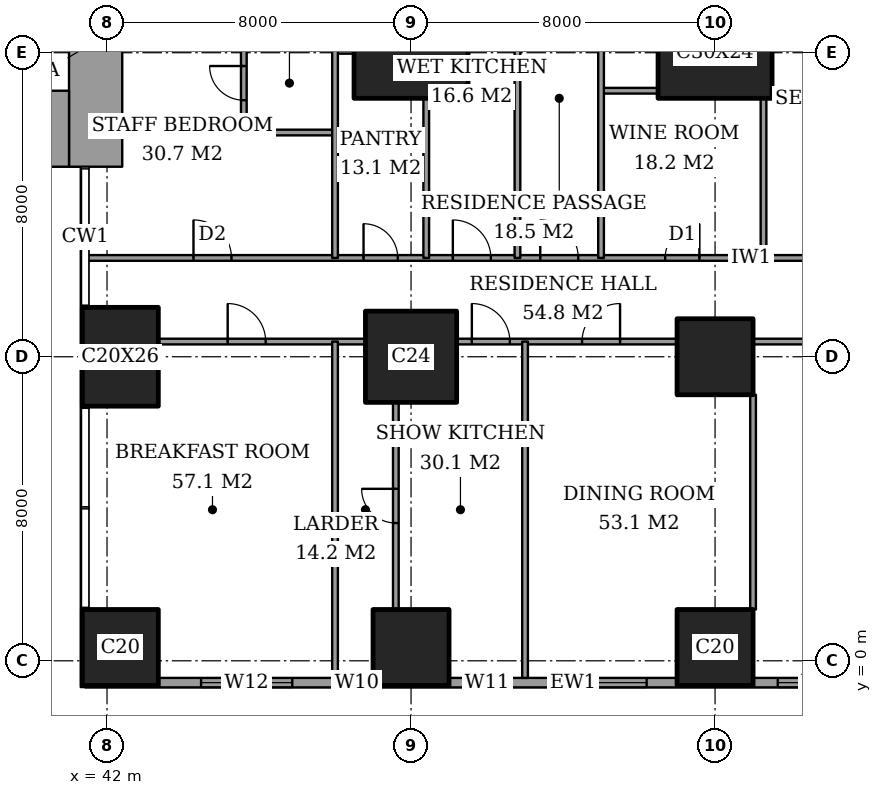
"""IFC4 building model, lengths in metres.
Left out: names, types, materials, properties, quantities, classifications, styles, units other than length and angle.
Written with IfcOpenShell. Run it as: python <this file> out.ifc"""

import sys

from ifc_helpers import new_model, si_unit, direction, frame, frame_2d, origin, origin_2d, place, context, subcontext, project, spatial, rectangle, extrude, element, fill, save


model = new_model("IFC4")
c1 = context("Model", 3, precision=1e-05, world=origin(), true_north=direction((0.0, 1.0)))
c2 = subcontext(c1, "Body", "Model", "MODEL_VIEW")
j1 = project(units=[si_unit("LENGTHUNIT", "METRE"), si_unit("PLANEANGLEUNIT", "RADIAN")], contexts=[c1])
p1 = place(None, origin())
s1 = spatial("IfcSite", under=j1, at=p1, CompositionType="ELEMENT")
p2 = place(p1, origin())
s2 = spatial("IfcBuilding", under=s1, at=p2, CompositionType="ELEMENT")
p3 = place(p2, frame((0.0, 0.0, 143.0)))
s3 = spatial("IfcBuildingStorey", under=s2, at=p3, CompositionType="ELEMENT", Elevation=143.0)
p4 = place(p3, frame((42.35, 0.35, 0.0), z_axis=(0.0, 0.0, 1.0), x_axis=(1.0, 0.0, 0.0)))
e1 = element("IfcColumn", 1, at=p4, inside=s3, PredefinedType="COLUMN", context=c2, shape_type="SweptSolid", body=[
    extrude(rectangle(XDim=2.0, YDim=2.0, at=origin_2d()), origin(), (0.0, 0.0, 1.0), 3.6),
])
p5 = place(p3, frame((42.35, 8.0, 0.0), z_axis=(0.0, 0.0, 1.0), x_axis=(1.0, 0.0, 0.0)))
e2 = element("IfcColumn", 2, at=p5, inside=s3, PredefinedType="COLUMN", context=c2, shape_type="SweptSolid", body=[
    extrude(rectangle(XDim=2.0, YDim=2.6, at=origin_2d()), origin(), (0.0, 0.0, 1.0), 3.6),
])
p6 = place(p3, frame((50.0, 0.35, 0.0), z_axis=(0.0, 0.0, 1.0), x_axis=(1.0, 0.0, 0.0)))
e3 = element("IfcColumn", 3, at=p6, inside=s3, PredefinedType="COLUMN", context=c2, shape_type="SweptSolid", body=[
    extrude(rectangle(XDim=2.0, YDim=2.0, at=origin_2d()), origin(), (0.0, 0.0, 1.0), 3.6),
])
p7 = place(p3, frame((50.0, 8.0, 0.0), z_axis=(0.0, 0.0, 1.0), x_axis=(1.0, 0.0, 0.0)))
e4 = element("IfcColumn", 4, at=p7, inside=s3, PredefinedType="COLUMN", context=c2, shape_type="SweptSolid", body=[
    extrude(rectangle(XDim=2.4, YDim=2.4, at=origin_2d()), origin(), (0.0, 0.0, 1.0), 3.6),
])
p8 = place(p3, frame((50.0, 16.0, 0.0), z_axis=(0.0, 0.0, 1.0), x_axis=(1.0, 0.0, 0.0)))
e5 = element("IfcColumn", 5, at=p8, inside=s3, PredefinedType="COLUMN", context=c2, shape_type="SweptSolid", body=[
    extrude(rectangle(XDim=3.0, YDim=2.4, at=origin_2d()), origin(), (0.0, 0.0, 1.0), 3.6),
])
for number, where, z_axis, x_axis in (
    (6, (58.0, 0.35, 0.0), (0.0, 0.0, 1.0), (1.0, 0.0, 0.0)),
    (7, (58.0, 8.0, 0.0), (0.0, 0.0, 1.0), (1.0, 0.0, 0.0)),
):
    element("IfcColumn", number, at=place(p3, frame(where, z_axis=z_axis, x_axis=x_axis)), inside=s3, PredefinedType="COLUMN", context=c2, shape_type="SweptSolid", body=[
        extrude(rectangle(XDim=2.0, YDim=2.0, at=origin_2d()), origin(), (0.0, 0.0, 1.0), 3.6),
    ])
p9 = place(p3, frame((58.0, 16.0, 0.0), z_axis=(0.0, 0.0, 1.0), x_axis=(1.0, 0.0, 0.0)))
e8 = element("IfcColumn", 8, at=p9, inside=s3, PredefinedType="COLUMN", context=c2, shape_type="SweptSolid", body=[
    extrude(rectangle(XDim=3.0, YDim=2.4, at=origin_2d()), origin(), (0.0, 0.0, 1.0), 3.6),
])
p10 = place(p3, frame((37.85, 14.0, 0.0), z_axis=(0.0, 0.0, 1.0), x_axis=(1.0, 0.0, 0.0)))
e9 = element("IfcWall", 9, at=p10, inside=s3, PredefinedType="SHEAR", context=c2, shape_type="SweptSolid", body=[
    extrude(rectangle(XDim=3.15, YDim=2.0, at=frame_2d((1.575, 0.0))), origin(), (0.0, 0.0, 1.0), 3.6),
])
p11 = place(p3, frame((41.7, 13.0, 0.0), z_axis=(0.0, 0.0, 1.0), x_axis=(0.0, 1.0, 0.0)))
e10 = element("IfcWall", 10, at=p11, inside=s3, PredefinedType="SHEAR", context=c2, shape_type="SweptSolid", body=[
    extrude(rectangle(XDim=11.85, YDim=1.4, at=frame_2d((5.925, 0.0))), origin(), (0.0, 0.0, 1.0), 3.6),
])
p12 = place(p11, frame((7.5, 0.0, 0.0)))
e11 = element("IfcOpeningElement", 11, at=p12, cuts=e10, PredefinedType="OPENING", context=c2, shape_type="SweptSolid", body=[
    extrude(rectangle(XDim=1.8, YDim=2.4, at=frame_2d((0.9, 1.2))), frame((0.0, 0.71, 0.0), z_axis=(0.0, -1.0, 0.0), x_axis=(1.0, 0.0, 0.0)), (0.0, 0.0, 1.0), 1.42),
])
p13 = place(p3, frame((41.425, -0.575, 0.0), z_axis=(0.0, 0.0, 1.0), x_axis=(1.0, 0.0, 0.0)))
e12 = element("IfcWall", 12, at=p13, inside=s3, PredefinedType="SOLIDWALL", context=c2, shape_type="SweptSolid", body=[
    extrude(rectangle(XDim=21.4, YDim=0.25, at=frame_2d((10.7, 0.0))), origin(), (0.0, 0.0, 1.0), 3.6),
])
p14 = place(p13, frame((3.05, 0.0, 0.4)))
e13 = element("IfcOpeningElement", 13, at=p14, cuts=e12, PredefinedType="OPENING", context=c2, shape_type="SweptSolid", body=[
    extrude(rectangle(XDim=2.4, YDim=2.2, at=frame_2d((1.2, 1.1))), frame((0.0, 0.135, 0.0), z_axis=(0.0, -1.0, 0.0), x_axis=(1.0, 0.0, 0.0)), (0.0, 0.0, 1.0), 0.27),
])
p15 = place(p13, frame((6.85, 0.0, 0.4)))
e14 = element("IfcOpeningElement", 14, at=p15, cuts=e12, PredefinedType="OPENING", context=c2, shape_type="SweptSolid", body=[
    extrude(rectangle(XDim=0.6, YDim=2.2, at=frame_2d((0.3, 1.1))), frame((0.0, 0.135, 0.0), z_axis=(0.0, -1.0, 0.0), x_axis=(1.0, 0.0, 0.0)), (0.0, 0.0, 1.0), 0.27),
])
p16 = place(p13, frame((9.975, 0.0, 0.4)))
e15 = element("IfcOpeningElement", 15, at=p16, cuts=e12, PredefinedType="OPENING", context=c2, shape_type="SweptSolid", body=[
    extrude(rectangle(XDim=1.2, YDim=2.2, at=frame_2d((0.6, 1.1))), frame((0.0, 0.135, 0.0), z_axis=(0.0, -1.0, 0.0), x_axis=(1.0, 0.0, 0.0)), (0.0, 0.0, 1.0), 0.27),
])
p17 = place(p13, frame((12.375, 0.0, 0.4)))
e16 = element("IfcOpeningElement", 16, at=p17, cuts=e12, PredefinedType="OPENING", context=c2, shape_type="SweptSolid", body=[
    extrude(rectangle(XDim=2.4, YDim=2.2, at=frame_2d((1.2, 1.1))), frame((0.0, 0.135, 0.0), z_axis=(0.0, -1.0, 0.0), x_axis=(1.0, 0.0, 0.0)), (0.0, 0.0, 1.0), 0.27),
])
p18 = place(p13, frame((18.225, 0.0, 0.4)))
e17 = element("IfcOpeningElement", 17, at=p18, cuts=e12, PredefinedType="OPENING", context=c2, shape_type="SweptSolid", body=[
    extrude(rectangle(XDim=2.4, YDim=2.2, at=frame_2d((1.2, 1.1))), frame((0.0, 0.135, 0.0), z_axis=(0.0, -1.0, 0.0), x_axis=(1.0, 0.0, 0.0)), (0.0, 0.0, 1.0), 0.27),
])
p19 = place(p3, frame((43.35, 8.4, 0.0), z_axis=(0.0, 0.0, 1.0), x_axis=(1.0, 0.0, 0.0)))
e18 = element("IfcWall", 18, at=p19, inside=s3, PredefinedType="PARTITIONING", context=c2, shape_type="SweptSolid", body=[
    extrude(rectangle(XDim=5.45, YDim=0.15, at=frame_2d((2.725, 0.0))), origin(), (0.0, 0.0, 1.0), 3.35),
])
p20 = place(p19, frame((1.825, 0.0, 0.0)))
e19 = element("IfcOpeningElement", 19, at=p20, cuts=e18, PredefinedType="OPENING", context=c2, shape_type="SweptSolid", body=[
    extrude(rectangle(XDim=1.0, YDim=2.1, at=frame_2d((0.5, 1.05))), frame((0.0, 0.085, 0.0), z_axis=(0.0, -1.0, 0.0), x_axis=(1.0, 0.0, 0.0)), (0.0, 0.0, 1.0), 0.17),
])
p21 = place(p3, frame((51.2, 8.4, 0.0), z_axis=(0.0, 0.0, 1.0), x_axis=(1.0, 0.0, 0.0)))
e20 = element("IfcWall", 20, at=p21, inside=s3, PredefinedType="PARTITIONING", context=c2, shape_type="SweptSolid", body=[
    extrude(rectangle(XDim=5.8, YDim=0.15, at=frame_2d((2.9, 0.0))), origin(), (0.0, 0.0, 1.0), 3.35),
])
p22 = place(p21, frame((3.3, 0.0, 0.0)))
e21 = element("IfcOpeningElement", 21, at=p22, cuts=e20, PredefinedType="OPENING", context=c2, shape_type="SweptSolid", body=[
    extrude(rectangle(XDim=1.0, YDim=2.1, at=frame_2d((0.5, 1.05))), frame((0.0, 0.085, 0.0), z_axis=(0.0, -1.0, 0.0), x_axis=(1.0, 0.0, 0.0)), (0.0, 0.0, 1.0), 0.17),
])
p23 = place(p21, frame((0.4, 0.0, 0.0)))
e22 = element("IfcOpeningElement", 22, at=p23, cuts=e20, PredefinedType="OPENING", context=c2, shape_type="SweptSolid", body=[
    extrude(rectangle(XDim=1.0, YDim=2.1, at=frame_2d((0.5, 1.05))), frame((0.0, 0.085, 0.0), z_axis=(0.0, -1.0, 0.0), x_axis=(1.0, 0.0, 0.0)), (0.0, 0.0, 1.0), 0.17),
])
p24 = place(p3, frame((59.0, 8.4, 0.0), z_axis=(0.0, 0.0, 1.0), x_axis=(1.0, 0.0, 0.0)))
e23 = element("IfcWall", 23, at=p24, inside=s3, PredefinedType="PARTITIONING", context=c2, shape_type="SweptSolid", body=[
    extrude(rectangle(XDim=5.65, YDim=0.15, at=frame_2d((2.825, 0.0))), origin(), (0.0, 0.0, 1.0), 3.35),
])
p25 = place(p24, frame((2.325, 0.0, 0.0)))
e24 = element("IfcOpeningElement", 24, at=p25, cuts=e23, PredefinedType="OPENING", context=c2, shape_type="SweptSolid", body=[
    extrude(rectangle(XDim=1.0, YDim=2.1, at=frame_2d((0.5, 1.05))), frame((0.0, 0.085, 0.0), z_axis=(0.0, -1.0, 0.0), x_axis=(1.0, 0.0, 0.0)), (0.0, 0.0, 1.0), 0.17),
])
p26 = place(p3, frame((41.439, 10.6, 0.0), z_axis=(0.0, 0.0, 1.0), x_axis=(1.0, 0.0, 0.0)))
e25 = element("IfcWall", 25, at=p26, inside=s3, PredefinedType="PARTITIONING", context=c2, shape_type="SweptSolid", body=[
    extrude(rectangle(XDim=25.011, YDim=0.15, at=frame_2d((12.505, 0.0))), origin(), (0.0, 0.0, 1.0), 3.35),
])
p27 = place(p26, frame((11.961, 0.0, 0.0)))
e26 = element("IfcOpeningElement", 26, at=p27, cuts=e25, PredefinedType="OPENING", context=c2, shape_type="SweptSolid", body=[
    extrude(rectangle(XDim=1.0, YDim=2.1, at=frame_2d((0.5, 1.05))), frame((0.0, 0.085, 0.0), z_axis=(0.0, -1.0, 0.0), x_axis=(1.0, 0.0, 0.0)), (0.0, 0.0, 1.0), 0.17),
])
p28 = place(p26, frame((20.924, 0.0, 0.0)))
e27 = element("IfcOpeningElement", 27, at=p28, cuts=e25, PredefinedType="OPENING", context=c2, shape_type="SweptSolid", body=[
    extrude(rectangle(XDim=1.0, YDim=2.1, at=frame_2d((0.5, 1.05))), frame((0.0, 0.085, 0.0), z_axis=(0.0, -1.0, 0.0), x_axis=(1.0, 0.0, 0.0)), (0.0, 0.0, 1.0), 0.17),
])
p29 = place(p26, frame((15.249, 0.0, 0.0)))
e28 = element("IfcOpeningElement", 28, at=p29, cuts=e25, PredefinedType="OPENING", context=c2, shape_type="SweptSolid", body=[
    extrude(rectangle(XDim=0.9, YDim=2.1, at=frame_2d((0.45, 1.05))), frame((0.0, 0.085, 0.0), z_axis=(0.0, -1.0, 0.0), x_axis=(1.0, 0.0, 0.0)), (0.0, 0.0, 1.0), 0.17),
])
p30 = place(p26, frame((9.661, 0.0, 0.0)))
e29 = element("IfcOpeningElement", 29, at=p30, cuts=e25, PredefinedType="OPENING", context=c2, shape_type="SweptSolid", body=[
    extrude(rectangle(XDim=1.0, YDim=2.1, at=frame_2d((0.5, 1.05))), frame((0.0, 0.085, 0.0), z_axis=(0.0, -1.0, 0.0), x_axis=(1.0, 0.0, 0.0)), (0.0, 0.0, 1.0), 0.17),
])
p31 = place(p26, frame((7.311, 0.0, 0.0)))
e30 = element("IfcOpeningElement", 30, at=p31, cuts=e25, PredefinedType="OPENING", context=c2, shape_type="SweptSolid", body=[
    extrude(rectangle(XDim=0.9, YDim=2.1, at=frame_2d((0.45, 1.05))), frame((0.0, 0.085, 0.0), z_axis=(0.0, -1.0, 0.0), x_axis=(1.0, 0.0, 0.0)), (0.0, 0.0, 1.0), 0.17),
])
p32 = place(p26, frame((2.836, 0.0, 0.0)))
e31 = element("IfcOpeningElement", 31, at=p32, cuts=e25, PredefinedType="OPENING", context=c2, shape_type="SweptSolid", body=[
    extrude(rectangle(XDim=1.0, YDim=2.1, at=frame_2d((0.5, 1.05))), frame((0.0, 0.085, 0.0), z_axis=(0.0, -1.0, 0.0), x_axis=(1.0, 0.0, 0.0)), (0.0, 0.0, 1.0), 0.17),
])
p33 = place(p3, frame((45.6, 13.9, 0.0), z_axis=(0.0, 0.0, 1.0), x_axis=(1.0, 0.0, 0.0)))
e32 = element("IfcWall", 32, at=p33, inside=s3, PredefinedType="PARTITIONING", context=c2, shape_type="SweptSolid", body=[
    extrude(rectangle(XDim=2.4, YDim=0.15, at=frame_2d((1.2, 0.0))), origin(), (0.0, 0.0, 1.0), 3.35),
])
p34 = place(p3, frame((55.0, 15.0, 0.0), z_axis=(0.0, 0.0, 1.0), x_axis=(1.0, 0.0, 0.0)))
e33 = element("IfcWall", 33, at=p34, inside=s3, PredefinedType="PARTITIONING", context=c2, shape_type="SweptSolid", body=[
    extrude(rectangle(XDim=1.5, YDim=0.15, at=frame_2d((0.75, 0.0))), origin(), (0.0, 0.0, 1.0), 3.35),
])
p35 = place(p3, frame((48.0, 16.05, 0.0), z_axis=(0.0, 0.0, 1.0), x_axis=(1.0, 0.0, 0.0)))
e34 = element("IfcWall", 34, at=p35, inside=s3, PredefinedType="PARTITIONING", context=c2, shape_type="SweptSolid", body=[
    extrude(rectangle(XDim=0.5, YDim=0.15, at=frame_2d((0.25, 0.0))), origin(), (0.0, 0.0, 1.0), 2.634),
])
p36 = place(p3, frame((45.6, 13.9, 0.0), z_axis=(0.0, 0.0, 1.0), x_axis=(0.0, 1.0, 0.0)))
e35 = element("IfcWall", 35, at=p36, inside=s3, PredefinedType="PARTITIONING", context=c2, shape_type="SweptSolid", body=[
    extrude(rectangle(XDim=2.6, YDim=0.15, at=frame_2d((1.3, 0.0))), origin(), (0.0, 0.0, 1.0), 3.35),
])
p37 = place(p36, frame((0.85, 0.0, 0.0)))
e36 = element("IfcOpeningElement", 36, at=p37, cuts=e35, PredefinedType="OPENING", context=c2, shape_type="SweptSolid", body=[
    extrude(rectangle(XDim=0.9, YDim=2.1, at=frame_2d((0.45, 1.05))), frame((0.0, 0.085, 0.0), z_axis=(0.0, -1.0, 0.0), x_axis=(1.0, 0.0, 0.0)), (0.0, 0.0, 1.0), 0.17),
])
p38 = place(p3, frame((48.0, -0.45, 0.0), z_axis=(0.0, 0.0, 1.0), x_axis=(0.0, 1.0, 0.0)))
e37 = element("IfcWall", 37, at=p38, inside=s3, PredefinedType="PARTITIONING", context=c2, shape_type="SweptSolid", body=[
    extrude(rectangle(XDim=8.85, YDim=0.15, at=frame_2d((4.425, 0.0))), origin(), (0.0, 0.0, 1.0), 3.35),
])
p39 = place(p3, frame((48.0, 10.6, 0.0), z_axis=(0.0, 0.0, 1.0), x_axis=(0.0, 1.0, 0.0)))
e38 = element("IfcWall", 38, at=p39, inside=s3, PredefinedType="PARTITIONING", context=c2, shape_type="SweptSolid", body=[
    extrude(rectangle(XDim=8.4, YDim=0.15, at=frame_2d((4.2, 0.0))), origin(), (0.0, 0.0, 1.0), 3.35),
])
p40 = place(p39, frame((6.7, 0.0, 0.0)))
e39 = element("IfcOpeningElement", 39, at=p40, cuts=e38, PredefinedType="OPENING", context=c2, shape_type="SweptSolid", body=[
    extrude(rectangle(XDim=0.9, YDim=2.1, at=frame_2d((0.45, 1.05))), frame((0.0, 0.085, 0.0), z_axis=(0.0, -1.0, 0.0), x_axis=(1.0, 0.0, 0.0)), (0.0, 0.0, 1.0), 0.17),
])
p41 = place(p3, frame((49.6, 1.35, 0.0), z_axis=(0.0, 0.0, 1.0), x_axis=(0.0, 1.0, 0.0)))
e40 = element("IfcWall", 40, at=p41, inside=s3, PredefinedType="PARTITIONING", context=c2, shape_type="SweptSolid", body=[
    extrude(rectangle(XDim=5.45, YDim=0.15, at=frame_2d((2.725, 0.0))), origin(), (0.0, 0.0, 1.0), 3.35),
])
p42 = place(p41, frame((2.275, 0.0, 0.0)))
e41 = element("IfcOpeningElement", 41, at=p42, cuts=e40, PredefinedType="OPENING", context=c2, shape_type="SweptSolid", body=[
    extrude(rectangle(XDim=0.9, YDim=2.1, at=frame_2d((0.45, 1.05))), frame((0.0, 0.085, 0.0), z_axis=(0.0, -1.0, 0.0), x_axis=(1.0, 0.0, 0.0)), (0.0, 0.0, 1.0), 0.17),
])
p43 = place(p3, frame((50.4, 10.6, 0.0), z_axis=(0.0, 0.0, 1.0), x_axis=(0.0, 1.0, 0.0)))
e42 = element("IfcWall", 42, at=p43, inside=s3, PredefinedType="PARTITIONING", context=c2, shape_type="SweptSolid", body=[
    extrude(rectangle(XDim=4.2, YDim=0.15, at=frame_2d((2.1, 0.0))), origin(), (0.0, 0.0, 1.0), 3.35),
])
p44 = place(p3, frame((52.8, 10.6, 0.0), z_axis=(0.0, 0.0, 1.0), x_axis=(0.0, 1.0, 0.0)))
e43 = element("IfcWall", 43, at=p44, inside=s3, PredefinedType="PARTITIONING", context=c2, shape_type="SweptSolid", body=[
    extrude(rectangle(XDim=8.4, YDim=0.15, at=frame_2d((4.2, 0.0))), origin(), (0.0, 0.0, 1.0), 3.35),
])
p45 = place(p3, frame((53.0, -0.45, 0.0), z_axis=(0.0, 0.0, 1.0), x_axis=(0.0, 1.0, 0.0)))
e44 = element("IfcWall", 44, at=p45, inside=s3, PredefinedType="PARTITIONING", context=c2, shape_type="SweptSolid", body=[
    extrude(rectangle(XDim=8.85, YDim=0.15, at=frame_2d((4.425, 0.0))), origin(), (0.0, 0.0, 1.0), 3.35),
])
p46 = place(p3, frame((55.0, 10.6, 0.0), z_axis=(0.0, 0.0, 1.0), x_axis=(0.0, 1.0, 0.0)))
e45 = element("IfcWall", 45, at=p46, inside=s3, PredefinedType="PARTITIONING", context=c2, shape_type="SweptSolid", body=[
    extrude(rectangle(XDim=11.0, YDim=0.15, at=frame_2d((5.5, 0.0))), origin(), (0.0, 0.0, 1.0), 3.35),
])
p47 = place(p46, frame((9.2, 0.0, 0.0)))
e46 = element("IfcOpeningElement", 46, at=p47, cuts=e45, PredefinedType="OPENING", context=c2, shape_type="SweptSolid", body=[
    extrude(rectangle(XDim=1.0, YDim=2.1, at=frame_2d((0.5, 1.05))), frame((0.0, 0.085, 0.0), z_axis=(0.0, -1.0, 0.0), x_axis=(1.0, 0.0, 0.0)), (0.0, 0.0, 1.0), 0.17),
])
p48 = place(p3, frame((59.0, 1.35, 0.0), z_axis=(0.0, 0.0, 1.0), x_axis=(0.0, 1.0, 0.0)))
e47 = element("IfcWall", 47, at=p48, inside=s3, PredefinedType="PARTITIONING", context=c2, shape_type="SweptSolid", body=[
    extrude(rectangle(XDim=5.65, YDim=0.15, at=frame_2d((2.825, 0.0))), origin(), (0.0, 0.0, 1.0), 3.35),
])
p49 = place(p3, frame((59.275, 10.6, 0.0), z_axis=(0.0, 0.0, 1.0), x_axis=(0.0, 1.0, 0.0)))
e48 = element("IfcWall", 48, at=p49, inside=s3, PredefinedType="PARTITIONING", context=c2, shape_type="SweptSolid", body=[
    extrude(rectangle(XDim=4.2, YDim=0.15, at=frame_2d((2.1, 0.0))), origin(), (0.0, 0.0, 1.0), 3.35),
])
p50 = place(p14, origin())
e49 = element("IfcWindow", 49, at=p50, inside=s3, PartitioningType="SINGLE_PANEL", PredefinedType="WINDOW", context=c2, shape_type="SweptSolid", body=[
    extrude(rectangle(XDim=2.4, YDim=2.2, at=frame_2d((1.2, 1.1))), frame((0.0, 0.03, 0.0), z_axis=(0.0, -1.0, 0.0), x_axis=(1.0, 0.0, 0.0)), (0.0, 0.0, 1.0), 0.06),
])
fill(e13, e49)
p51 = place(p15, origin())
e50 = element("IfcWindow", 50, at=p51, inside=s3, PartitioningType="SINGLE_PANEL", PredefinedType="WINDOW", context=c2, shape_type="SweptSolid", body=[
    extrude(rectangle(XDim=0.6, YDim=2.2, at=frame_2d((0.3, 1.1))), frame((0.0, 0.03, 0.0), z_axis=(0.0, -1.0, 0.0), x_axis=(1.0, 0.0, 0.0)), (0.0, 0.0, 1.0), 0.06),
])
fill(e14, e50)
p52 = place(p16, origin())
e51 = element("IfcWindow", 51, at=p52, inside=s3, PartitioningType="SINGLE_PANEL", PredefinedType="WINDOW", context=c2, shape_type="SweptSolid", body=[
    extrude(rectangle(XDim=1.2, YDim=2.2, at=frame_2d((0.6, 1.1))), frame((0.0, 0.03, 0.0), z_axis=(0.0, -1.0, 0.0), x_axis=(1.0, 0.0, 0.0)), (0.0, 0.0, 1.0), 0.06),
])
fill(e15, e51)
p53 = place(p17, origin())
e52 = element("IfcWindow", 52, at=p53, inside=s3, PartitioningType="SINGLE_PANEL", PredefinedType="WINDOW", context=c2, shape_type="SweptSolid", body=[
    extrude(rectangle(XDim=2.4, YDim=2.2, at=frame_2d((1.2, 1.1))), frame((0.0, 0.03, 0.0), z_axis=(0.0, -1.0, 0.0), x_axis=(1.0, 0.0, 0.0)), (0.0, 0.0, 1.0), 0.06),
])
fill(e16, e52)
p54 = place(p18, origin())
e53 = element("IfcWindow", 53, at=p54, inside=s3, PartitioningType="SINGLE_PANEL", PredefinedType="WINDOW", context=c2, shape_type="SweptSolid", body=[
    extrude(rectangle(XDim=2.4, YDim=2.2, at=frame_2d((1.2, 1.1))), frame((0.0, 0.03, 0.0), z_axis=(0.0, -1.0, 0.0), x_axis=(1.0, 0.0, 0.0)), (0.0, 0.0, 1.0), 0.06),
])
fill(e17, e53)
p55 = place(p22, origin())
e54 = element("IfcDoor", 54, at=p55, inside=s3, OperationType="SINGLE_SWING_LEFT", PredefinedType="DOOR", context=c2, shape_type="SweptSolid", body=[
    extrude(rectangle(XDim=1.0, YDim=2.1, at=frame_2d((0.5, 1.05))), frame((0.0, 0.025, 0.0), z_axis=(0.0, -1.0, 0.0), x_axis=(1.0, 0.0, 0.0)), (0.0, 0.0, 1.0), 0.05),
])
fill(e21, e54)
p56 = place(p23, origin())
e55 = element("IfcDoor", 55, at=p56, inside=s3, OperationType="SINGLE_SWING_RIGHT", PredefinedType="DOOR", context=c2, shape_type="SweptSolid", body=[
    extrude(rectangle(XDim=1.0, YDim=2.1, at=frame_2d((0.5, 1.05))), frame((0.0, 0.025, 0.0), z_axis=(0.0, -1.0, 0.0), x_axis=(1.0, 0.0, 0.0)), (0.0, 0.0, 1.0), 0.05),
])
fill(e22, e55)
p57 = place(p42, origin())
e56 = element("IfcDoor", 56, at=p57, inside=s3, OperationType="SINGLE_SWING_LEFT", PredefinedType="DOOR", context=c2, shape_type="SweptSolid", body=[
    extrude(rectangle(XDim=0.9, YDim=2.1, at=frame_2d((0.45, 1.05))), frame((0.0, 0.025, 0.0), z_axis=(0.0, -1.0, 0.0), x_axis=(1.0, 0.0, 0.0)), (0.0, 0.0, 1.0), 0.05),
])
fill(e41, e56)
p58 = place(p20, origin())
e57 = element("IfcDoor", 57, at=p58, inside=s3, OperationType="SINGLE_SWING_RIGHT", PredefinedType="DOOR", context=c2, shape_type="SweptSolid", body=[
    extrude(rectangle(XDim=1.0, YDim=2.1, at=frame_2d((0.5, 1.05))), frame((0.0, 0.025, 0.0), z_axis=(0.0, -1.0, 0.0), x_axis=(1.0, 0.0, 0.0)), (0.0, 0.0, 1.0), 0.05),
])
fill(e19, e57)
p59 = place(p27, origin())
e58 = element("IfcDoor", 58, at=p59, inside=s3, OperationType="SINGLE_SWING_RIGHT", PredefinedType="DOOR", context=c2, shape_type="SweptSolid", body=[
    extrude(rectangle(XDim=1.0, YDim=2.1, at=frame_2d((0.5, 1.05))), frame((0.0, 0.025, 0.0), z_axis=(0.0, -1.0, 0.0), x_axis=(1.0, 0.0, 0.0)), (0.0, 0.0, 1.0), 0.05),
])
fill(e26, e58)
p60 = place(p29, origin())
e59 = element("IfcDoor", 59, at=p60, inside=s3, OperationType="SINGLE_SWING_LEFT", PredefinedType="DOOR", context=c2, shape_type="SweptSolid", body=[
    extrude(rectangle(XDim=0.9, YDim=2.1, at=frame_2d((0.45, 1.05))), frame((0.0, 0.025, 0.0), z_axis=(0.0, -1.0, 0.0), x_axis=(1.0, 0.0, 0.0)), (0.0, 0.0, 1.0), 0.05),
])
fill(e28, e59)
p61 = place(p30, origin())
e60 = element("IfcDoor", 60, at=p61, inside=s3, OperationType="SINGLE_SWING_RIGHT", PredefinedType="DOOR", context=c2, shape_type="SweptSolid", body=[
    extrude(rectangle(XDim=1.0, YDim=2.1, at=frame_2d((0.5, 1.05))), frame((0.0, 0.025, 0.0), z_axis=(0.0, -1.0, 0.0), x_axis=(1.0, 0.0, 0.0)), (0.0, 0.0, 1.0), 0.05),
])
fill(e29, e60)
p62 = place(p31, origin())
e61 = element("IfcDoor", 61, at=p62, inside=s3, OperationType="SINGLE_SWING_RIGHT", PredefinedType="DOOR", context=c2, shape_type="SweptSolid", body=[
    extrude(rectangle(XDim=0.9, YDim=2.1, at=frame_2d((0.45, 1.05))), frame((0.0, 0.025, 0.0), z_axis=(0.0, -1.0, 0.0), x_axis=(1.0, 0.0, 0.0)), (0.0, 0.0, 1.0), 0.05),
])
fill(e30, e61)
p63 = place(p37, origin())
e62 = element("IfcDoor", 62, at=p63, inside=s3, OperationType="SINGLE_SWING_LEFT", PredefinedType="DOOR", context=c2, shape_type="SweptSolid", body=[
    extrude(rectangle(XDim=0.9, YDim=2.1, at=frame_2d((0.45, 1.05))), frame((0.0, 0.025, 0.0), z_axis=(0.0, -1.0, 0.0), x_axis=(1.0, 0.0, 0.0)), (0.0, 0.0, 1.0), 0.05),
])
fill(e36, e62)
p64 = place(p32, origin())
e63 = element("IfcDoor", 63, at=p64, inside=s3, OperationType="SINGLE_SWING_RIGHT", PredefinedType="DOOR", context=c2, shape_type="SweptSolid", body=[
    extrude(rectangle(XDim=1.0, YDim=2.1, at=frame_2d((0.5, 1.05))), frame((0.0, 0.025, 0.0), z_axis=(0.0, -1.0, 0.0), x_axis=(1.0, 0.0, 0.0)), (0.0, 0.0, 1.0), 0.05),
])
fill(e31, e63)
save(model, sys.argv[1])
